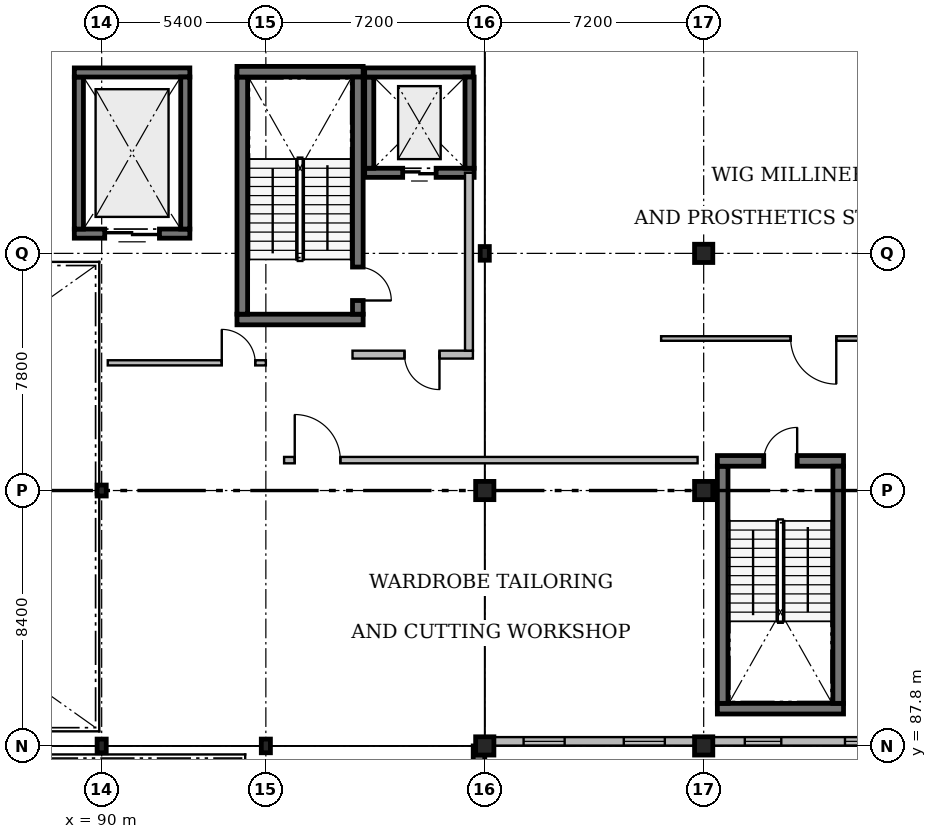
"""IFC4 building model, lengths in metres.
Left out: names, types, materials, properties, quantities, classifications, styles, units other than length and angle.
Written with IfcOpenShell. Run it as: python <this file> out.ifc"""

import sys

from ifc_helpers import new_model, si_unit, direction, frame, frame_2d, origin, origin_2d, place, context, subcontext, project, spatial, rectangle, i_section, extrude, element, fill, save


model = new_model("IFC4")
c1 = context("Model", 3, precision=1e-05, world=origin(), true_north=direction((0.0, 1.0)))
c2 = subcontext(c1, "Body", "Model", "MODEL_VIEW")
j1 = project(units=[si_unit("LENGTHUNIT", "METRE"), si_unit("PLANEANGLEUNIT", "RADIAN")], contexts=[c1])
p1 = place(None, origin())
s1 = spatial("IfcSite", under=j1, at=p1, CompositionType="ELEMENT")
p2 = place(p1, origin())
s2 = spatial("IfcBuilding", under=s1, at=p2, CompositionType="ELEMENT")
p3 = place(p2, frame((0.0, 0.0, 9.0)))
s3 = spatial("IfcBuildingStorey", under=s2, at=p3, CompositionType="ELEMENT", Elevation=9.0)
p4 = place(p3, frame((90.0, 87.8, 0.0), z_axis=(0.0, 0.0, 1.0), x_axis=(1.0, 0.0, 0.0)))
e1 = element("IfcColumn", 1, at=p4, inside=s3, PredefinedType="COLUMN", context=c2, shape_type="SweptSolid", body=[
    extrude(i_section(OverallWidth=0.3, OverallDepth=0.45, WebThickness=0.014, FlangeThickness=0.026, FilletRadius=0.027, at=origin_2d()), origin(), (0.0, 0.0, 1.0), 4.2),
])
p5 = place(p3, frame((90.0, 96.2, 0.0), z_axis=(0.0, 0.0, 1.0), x_axis=(1.0, 0.0, 0.0)))
e2 = element("IfcColumn", 2, at=p5, inside=s3, PredefinedType="COLUMN", context=c2, shape_type="SweptSolid", body=[
    extrude(i_section(OverallWidth=0.3, OverallDepth=0.36, WebThickness=0.012, FlangeThickness=0.022, FilletRadius=0.027, at=origin_2d()), origin(), (0.0, 0.0, 1.0), 4.2),
])
p6 = place(p3, frame((95.4, 87.8, 0.0), z_axis=(0.0, 0.0, 1.0), x_axis=(1.0, 0.0, 0.0)))
e3 = element("IfcColumn", 3, at=p6, inside=s3, PredefinedType="COLUMN", context=c2, shape_type="SweptSolid", body=[
    extrude(i_section(OverallWidth=0.3, OverallDepth=0.45, WebThickness=0.014, FlangeThickness=0.026, FilletRadius=0.027, at=origin_2d()), origin(), (0.0, 0.0, 1.0), 4.2),
])
for number, where, z_axis, x_axis in (
    (4, (102.6, 87.8, 0.0), (0.0, 0.0, 1.0), (1.0, 0.0, 0.0)),
    (5, (102.6, 96.2, 0.0), (0.0, 0.0, 1.0), (1.0, 0.0, 0.0)),
):
    element("IfcColumn", number, at=place(p3, frame(where, z_axis=z_axis, x_axis=x_axis)), inside=s3, PredefinedType="COLUMN", context=c2, shape_type="SweptSolid", body=[
        extrude(rectangle(XDim=0.6, YDim=0.6, at=origin_2d()), origin(), (0.0, 0.0, 1.0), 4.2),
    ])
p7 = place(p3, frame((102.6, 104.0, 0.0), z_axis=(0.0, 0.0, 1.0), x_axis=(1.0, 0.0, 0.0)))
e6 = element("IfcColumn", 6, at=p7, inside=s3, PredefinedType="COLUMN", context=c2, shape_type="SweptSolid", body=[
    extrude(i_section(OverallWidth=0.3, OverallDepth=0.45, WebThickness=0.014, FlangeThickness=0.026, FilletRadius=0.027, at=origin_2d()), origin(), (0.0, 0.0, 1.0), 4.2),
])
for number, where, z_axis, x_axis in (
    (7, (109.8, 87.8, 0.0), (0.0, 0.0, 1.0), (1.0, 0.0, 0.0)),
    (8, (109.8, 96.2, 0.0), (0.0, 0.0, 1.0), (1.0, 0.0, 0.0)),
    (9, (109.8, 104.0, 0.0), (0.0, 0.0, 1.0), (1.0, 0.0, 0.0)),
):
    element("IfcColumn", number, at=place(p3, frame(where, z_axis=z_axis, x_axis=x_axis)), inside=s3, PredefinedType="COLUMN", context=c2, shape_type="SweptSolid", body=[
        extrude(rectangle(XDim=0.6, YDim=0.6, at=origin_2d()), origin(), (0.0, 0.0, 1.0), 4.2),
    ])
p8 = place(p3, frame((98.6, 101.825, 0.0), z_axis=(0.0, 0.0, 1.0), x_axis=(-1.0, 0.0, 0.0)))
e10 = element("IfcWall", 10, at=p8, inside=s3, PredefinedType="SOLIDWALL", context=c2, shape_type="SweptSolid", body=[
    extrude(rectangle(XDim=4.15, YDim=0.35, at=frame_2d((2.075, 0.0))), origin(), (0.0, 0.0, 1.0), 4.2),
])
p9 = place(p3, frame((94.625, 102.0, 0.0), z_axis=(0.0, 0.0, 1.0), x_axis=(0.0, 1.0, 0.0)))
e11 = element("IfcWall", 11, at=p9, inside=s3, PredefinedType="SOLIDWALL", context=c2, shape_type="SweptSolid", body=[
    extrude(rectangle(XDim=7.8, YDim=0.35, at=frame_2d((3.9, 0.0))), origin(), (0.0, 0.0, 1.0), 4.2),
])
p10 = place(p3, frame((94.45, 109.975, 0.0), z_axis=(0.0, 0.0, 1.0), x_axis=(1.0, 0.0, 0.0)))
e12 = element("IfcWall", 12, at=p10, inside=s3, PredefinedType="SOLIDWALL", context=c2, shape_type="SweptSolid", body=[
    extrude(rectangle(XDim=4.15, YDim=0.35, at=frame_2d((2.075, 0.0))), origin(), (0.0, 0.0, 1.0), 4.2),
])
p11 = place(p3, frame((98.425, 109.8, 0.0), z_axis=(0.0, 0.0, 1.0), x_axis=(0.0, -1.0, 0.0)))
e13 = element("IfcWall", 13, at=p11, inside=s3, PredefinedType="SOLIDWALL", context=c2, shape_type="SweptSolid", body=[
    extrude(rectangle(XDim=7.8, YDim=0.35, at=frame_2d((3.9, 0.0))), origin(), (0.0, 0.0, 1.0), 4.2),
])
p12 = place(p11, frame((6.25, 0.0, 0.0)))
e14 = element("IfcOpeningElement", 14, at=p12, cuts=e13, PredefinedType="OPENING", context=c2, shape_type="SweptSolid", body=[
    extrude(rectangle(XDim=1.1, YDim=2.15, at=frame_2d((0.55, 1.075))), frame((0.0, 0.195, 0.0), z_axis=(0.0, -1.0, 0.0), x_axis=(1.0, 0.0, 0.0)), (0.0, 0.0, 1.0), 0.39),
])
p13 = place(p3, frame((102.25, 106.65, 0.0), z_axis=(0.0, 0.0, 1.0), x_axis=(-1.0, 0.0, 0.0)))
e15 = element("IfcWall", 15, at=p13, inside=s3, PredefinedType="SOLIDWALL", context=c2, shape_type="SweptSolid", body=[
    extrude(rectangle(XDim=3.6, YDim=0.3, at=frame_2d((1.8, 0.0))), origin(), (0.0, 0.0, 1.0), 4.2),
])
p14 = place(p13, frame((1.25, 0.0, 0.0)))
e16 = element("IfcOpeningElement", 16, at=p14, cuts=e15, PredefinedType="OPENING", context=c2, shape_type="SweptSolid", body=[
    extrude(rectangle(XDim=1.1, YDim=2.1, at=frame_2d((0.55, 1.05))), frame((0.0, 0.17, 0.0), z_axis=(0.0, -1.0, 0.0), x_axis=(1.0, 0.0, 0.0)), (0.0, 0.0, 1.0), 0.34),
])
p15 = place(p3, frame((98.8, 106.8, 0.0), z_axis=(0.0, 0.0, 1.0), x_axis=(0.0, 1.0, 0.0)))
e17 = element("IfcWall", 17, at=p15, inside=s3, PredefinedType="SOLIDWALL", context=c2, shape_type="SweptSolid", body=[
    extrude(rectangle(XDim=3.0, YDim=0.3, at=frame_2d((1.5, 0.0))), origin(), (0.0, 0.0, 1.0), 4.2),
])
p16 = place(p3, frame((98.65, 109.95, 0.0), z_axis=(0.0, 0.0, 1.0), x_axis=(1.0, 0.0, 0.0)))
e18 = element("IfcWall", 18, at=p16, inside=s3, PredefinedType="SOLIDWALL", context=c2, shape_type="SweptSolid", body=[
    extrude(rectangle(XDim=3.57, YDim=0.3, at=frame_2d((1.785, 0.0))), origin(), (0.0, 0.0, 1.0), 4.2),
])
p17 = place(p3, frame((102.1, 109.8, 0.0), z_axis=(0.0, 0.0, 1.0), x_axis=(0.0, -1.0, 0.0)))
e19 = element("IfcWall", 19, at=p17, inside=s3, PredefinedType="SOLIDWALL", context=c2, shape_type="SweptSolid", body=[
    extrude(rectangle(XDim=3.0, YDim=0.3, at=frame_2d((1.5, 0.0))), origin(), (0.0, 0.0, 1.0), 4.2),
])
p18 = place(p3, frame((102.21, 100.67, 0.0), z_axis=(0.0, 0.0, 1.0), x_axis=(-1.0, 0.0, 0.0)))
e20 = element("IfcWall", 20, at=p18, inside=s3, PredefinedType="SOLIDWALL", context=c2, shape_type="SweptSolid", body=[
    extrude(rectangle(XDim=3.96, YDim=0.26, at=frame_2d((1.98, 0.0))), origin(), (0.0, 0.0, 1.0), 3.95),
])
p19 = place(p18, frame((1.1, 0.0, 0.0)))
e21 = element("IfcOpeningElement", 21, at=p19, cuts=e20, PredefinedType="OPENING", context=c2, shape_type="SweptSolid", body=[
    extrude(rectangle(XDim=1.15, YDim=2.2, at=frame_2d((0.575, 1.1))), frame((0.0, 0.15, 0.0), z_axis=(0.0, -1.0, 0.0), x_axis=(1.0, 0.0, 0.0)), (0.0, 0.0, 1.0), 0.3),
])
p20 = place(p3, frame((102.08, 106.65, 0.0), z_axis=(0.0, 0.0, 1.0), x_axis=(0.0, -1.0, 0.0)))
e22 = element("IfcWall", 22, at=p20, inside=s3, PredefinedType="SOLIDWALL", context=c2, shape_type="SweptSolid", body=[
    extrude(rectangle(XDim=5.85, YDim=0.26, at=frame_2d((2.925, 0.0))), origin(), (0.0, 0.0, 1.0), 3.95),
])
p21 = place(p3, frame((114.4, 89.025, 0.0), z_axis=(0.0, 0.0, 1.0), x_axis=(-1.0, 0.0, 0.0)))
e23 = element("IfcWall", 23, at=p21, inside=s3, PredefinedType="SOLIDWALL", context=c2, shape_type="SweptSolid", body=[
    extrude(rectangle(XDim=4.15, YDim=0.35, at=frame_2d((2.075, 0.0))), origin(), (0.0, 0.0, 1.0), 4.2),
])
p22 = place(p3, frame((110.425, 89.2, 0.0), z_axis=(0.0, 0.0, 1.0), x_axis=(0.0, 1.0, 0.0)))
e24 = element("IfcWall", 24, at=p22, inside=s3, PredefinedType="SOLIDWALL", context=c2, shape_type="SweptSolid", body=[
    extrude(rectangle(XDim=7.8, YDim=0.35, at=frame_2d((3.9, 0.0))), origin(), (0.0, 0.0, 1.0), 4.2),
])
p23 = place(p3, frame((110.25, 97.175, 0.0), z_axis=(0.0, 0.0, 1.0), x_axis=(1.0, 0.0, 0.0)))
e25 = element("IfcWall", 25, at=p23, inside=s3, PredefinedType="SOLIDWALL", context=c2, shape_type="SweptSolid", body=[
    extrude(rectangle(XDim=4.15, YDim=0.35, at=frame_2d((2.075, 0.0))), origin(), (0.0, 0.0, 1.0), 4.2),
])
p24 = place(p23, frame((1.525, 0.0, 0.0)))
e26 = element("IfcOpeningElement", 26, at=p24, cuts=e25, PredefinedType="OPENING", context=c2, shape_type="SweptSolid", body=[
    extrude(rectangle(XDim=1.1, YDim=2.15, at=frame_2d((0.55, 1.075))), frame((0.0, 0.195, 0.0), z_axis=(0.0, -1.0, 0.0), x_axis=(1.0, 0.0, 0.0)), (0.0, 0.0, 1.0), 0.39),
])
p25 = place(p3, frame((114.225, 97.0, 0.0), z_axis=(0.0, 0.0, 1.0), x_axis=(0.0, -1.0, 0.0)))
e27 = element("IfcWall", 27, at=p25, inside=s3, PredefinedType="SOLIDWALL", context=c2, shape_type="SweptSolid", body=[
    extrude(rectangle(XDim=7.8, YDim=0.35, at=frame_2d((3.9, 0.0))), origin(), (0.0, 0.0, 1.0), 4.2),
])
p26 = place(p3, frame((92.9, 104.65, 0.0), z_axis=(0.0, 0.0, 1.0), x_axis=(-1.0, 0.0, 0.0)))
e28 = element("IfcWall", 28, at=p26, inside=s3, PredefinedType="SOLIDWALL", context=c2, shape_type="SweptSolid", body=[
    extrude(rectangle(XDim=3.8, YDim=0.3, at=frame_2d((1.9, 0.0))), origin(), (0.0, 0.0, 1.0), 4.2),
])
p27 = place(p26, frame((1.0, 0.0, 0.0)))
e29 = element("IfcOpeningElement", 29, at=p27, cuts=e28, PredefinedType="OPENING", context=c2, shape_type="SweptSolid", body=[
    extrude(rectangle(XDim=1.8, YDim=2.4, at=frame_2d((0.9, 1.2))), frame((0.0, 0.17, 0.0), z_axis=(0.0, -1.0, 0.0), x_axis=(1.0, 0.0, 0.0)), (0.0, 0.0, 1.0), 0.34),
])
p28 = place(p3, frame((89.25, 104.8, 0.0), z_axis=(0.0, 0.0, 1.0), x_axis=(0.0, 1.0, 0.0)))
e30 = element("IfcWall", 30, at=p28, inside=s3, PredefinedType="SOLIDWALL", context=c2, shape_type="SweptSolid", body=[
    extrude(rectangle(XDim=5.0, YDim=0.3, at=frame_2d((2.5, 0.0))), origin(), (0.0, 0.0, 1.0), 4.2),
])
p29 = place(p3, frame((89.1, 109.95, 0.0), z_axis=(0.0, 0.0, 1.0), x_axis=(1.0, 0.0, 0.0)))
e31 = element("IfcWall", 31, at=p29, inside=s3, PredefinedType="SOLIDWALL", context=c2, shape_type="SweptSolid", body=[
    extrude(rectangle(XDim=3.8, YDim=0.3, at=frame_2d((1.9, 0.0))), origin(), (0.0, 0.0, 1.0), 4.2),
])
p30 = place(p3, frame((92.75, 109.8, 0.0), z_axis=(0.0, 0.0, 1.0), x_axis=(0.0, -1.0, 0.0)))
e32 = element("IfcWall", 32, at=p30, inside=s3, PredefinedType="SOLIDWALL", context=c2, shape_type="SweptSolid", body=[
    extrude(rectangle(XDim=5.0, YDim=0.3, at=frame_2d((2.5, 0.0))), origin(), (0.0, 0.0, 1.0), 4.2),
])
p31 = place(p3, frame((102.41, 87.8, 0.0), z_axis=(0.0, 0.0, 1.0), x_axis=(0.0, -1.0, 0.0)))
e33 = element("IfcWall", 33, at=p31, inside=s3, PredefinedType="SOLIDWALL", context=c2, shape_type="SweptSolid", body=[
    extrude(rectangle(XDim=36.0, YDim=0.38, at=frame_2d((18.0, 0.0))), origin(), (0.0, 0.0, 1.0), 3.96),
])
p32 = place(p31, frame((3.09, 0.0, 0.95)))
e34 = element("IfcOpeningElement", 34, at=p32, cuts=e33, PredefinedType="OPENING", context=c2, shape_type="SweptSolid", body=[
    extrude(rectangle(XDim=1.02, YDim=1.8, at=frame_2d((0.51, 0.9))), frame((0.0, 0.21, 0.0), z_axis=(0.0, -1.0, 0.0), x_axis=(1.0, 0.0, 0.0)), (0.0, 0.0, 1.0), 0.42),
])
p33 = place(p31, frame((10.11, 0.0, 0.95)))
e35 = element("IfcOpeningElement", 35, at=p33, cuts=e33, PredefinedType="OPENING", context=c2, shape_type="SweptSolid", body=[
    extrude(rectangle(XDim=1.38, YDim=1.95, at=frame_2d((0.69, 0.975))), frame((0.0, 0.21, 0.0), z_axis=(0.0, -1.0, 0.0), x_axis=(1.0, 0.0, 0.0)), (0.0, 0.0, 1.0), 0.42),
])
p34 = place(p31, frame((17.375, 0.0, 0.95)))
e36 = element("IfcOpeningElement", 36, at=p34, cuts=e33, PredefinedType="OPENING", context=c2, shape_type="SweptSolid", body=[
    extrude(rectangle(XDim=1.25, YDim=1.9, at=frame_2d((0.625, 0.95))), frame((0.0, 0.21, 0.0), z_axis=(0.0, -1.0, 0.0), x_axis=(1.0, 0.0, 0.0)), (0.0, 0.0, 1.0), 0.42),
])
p35 = place(p31, frame((24.63, 0.0, 0.95)))
e37 = element("IfcOpeningElement", 37, at=p35, cuts=e33, PredefinedType="OPENING", context=c2, shape_type="SweptSolid", body=[
    extrude(rectangle(XDim=1.14, YDim=1.85, at=frame_2d((0.57, 0.925))), frame((0.0, 0.21, 0.0), z_axis=(0.0, -1.0, 0.0), x_axis=(1.0, 0.0, 0.0)), (0.0, 0.0, 1.0), 0.42),
])
p36 = place(p31, frame((31.525, 0.0, 0.95)))
e38 = element("IfcOpeningElement", 38, at=p36, cuts=e33, PredefinedType="OPENING", context=c2, shape_type="SweptSolid", body=[
    extrude(rectangle(XDim=1.75, YDim=1.65, at=frame_2d((0.875, 0.825))), frame((0.0, 0.21, 0.0), z_axis=(0.0, -1.0, 0.0), x_axis=(1.0, 0.0, 0.0)), (0.0, 0.0, 1.0), 0.42),
])
p37 = place(p3, frame((102.905, 87.95, 0.0), z_axis=(0.0, 0.0, 1.0), x_axis=(1.0, 0.0, 0.0)))
e39 = element("IfcWall", 39, at=p37, inside=s3, PredefinedType="SOLIDWALL", context=c2, shape_type="SweptSolid", body=[
    extrude(rectangle(XDim=6.59, YDim=0.28, at=frame_2d((3.295, 0.0))), origin(), (0.0, 0.0, 1.0), 3.263),
])
p38 = place(p37, frame((0.972, 0.0, 0.95)))
e40 = element("IfcOpeningElement", 40, at=p38, cuts=e39, PredefinedType="OPENING", context=c2, shape_type="SweptSolid", body=[
    extrude(rectangle(XDim=1.35, YDim=1.7, at=frame_2d((0.675, 0.85))), frame((0.0, 0.16, 0.0), z_axis=(0.0, -1.0, 0.0), x_axis=(1.0, 0.0, 0.0)), (0.0, 0.0, 1.0), 0.32),
])
p39 = place(p37, frame((4.268, 0.0, 0.95)))
e41 = element("IfcOpeningElement", 41, at=p39, cuts=e39, PredefinedType="OPENING", context=c2, shape_type="SweptSolid", body=[
    extrude(rectangle(XDim=1.35, YDim=1.7, at=frame_2d((0.675, 0.85))), frame((0.0, 0.16, 0.0), z_axis=(0.0, -1.0, 0.0), x_axis=(1.0, 0.0, 0.0)), (0.0, 0.0, 1.0), 0.32),
])
p40 = place(p3, frame((110.105, 87.95, 0.0), z_axis=(0.0, 0.0, 1.0), x_axis=(1.0, 0.0, 0.0)))
e42 = element("IfcWall", 42, at=p40, inside=s3, PredefinedType="SOLIDWALL", context=c2, shape_type="SweptSolid", body=[
    extrude(rectangle(XDim=6.59, YDim=0.28, at=frame_2d((3.295, 0.0))), origin(), (0.0, 0.0, 1.0), 3.263),
])
p41 = place(p40, frame((1.048, 0.0, 0.95)))
e43 = element("IfcOpeningElement", 43, at=p41, cuts=e42, PredefinedType="OPENING", context=c2, shape_type="SweptSolid", body=[
    extrude(rectangle(XDim=1.2, YDim=1.9, at=frame_2d((0.6, 0.95))), frame((0.0, 0.16, 0.0), z_axis=(0.0, -1.0, 0.0), x_axis=(1.0, 0.0, 0.0)), (0.0, 0.0, 1.0), 0.32),
])
p42 = place(p40, frame((4.343, 0.0, 0.95)))
e44 = element("IfcOpeningElement", 44, at=p42, cuts=e42, PredefinedType="OPENING", context=c2, shape_type="SweptSolid", body=[
    extrude(rectangle(XDim=1.2, YDim=1.9, at=frame_2d((0.6, 0.95))), frame((0.0, 0.16, 0.0), z_axis=(0.0, -1.0, 0.0), x_axis=(1.0, 0.0, 0.0)), (0.0, 0.0, 1.0), 0.32),
])
p43 = place(p3, frame((96.0, 97.2, 0.0), z_axis=(0.0, 0.0, 1.0), x_axis=(1.0, 0.0, 0.0)))
e45 = element("IfcWall", 45, at=p43, inside=s3, PredefinedType="PARTITIONING", context=c2, shape_type="SweptSolid", body=[
    extrude(rectangle(XDim=13.6, YDim=0.21, at=frame_2d((6.8, 0.0))), origin(), (0.0, 0.0, 1.0), 3.95),
])
p44 = place(p43, frame((0.35, 0.0, 0.0)))
e46 = element("IfcOpeningElement", 46, at=p44, cuts=e45, PredefinedType="OPENING", context=c2, shape_type="SweptSolid", body=[
    extrude(rectangle(XDim=1.5, YDim=2.25, at=frame_2d((0.75, 1.125))), frame((0.0, 0.125, 0.0), z_axis=(0.0, -1.0, 0.0), x_axis=(1.0, 0.0, 0.0)), (0.0, 0.0, 1.0), 0.25),
])
p45 = place(p3, frame((117.2, 101.2, 0.0), z_axis=(0.0, 0.0, 1.0), x_axis=(-1.0, 0.0, 0.0)))
e47 = element("IfcWall", 47, at=p45, inside=s3, PredefinedType="PARTITIONING", context=c2, shape_type="SweptSolid", body=[
    extrude(rectangle(XDim=8.8, YDim=0.15, at=frame_2d((4.4, 0.0))), origin(), (0.0, 0.0, 1.0), 3.93),
])
p46 = place(p45, frame((3.039, 0.0, 0.0)))
e48 = element("IfcOpeningElement", 48, at=p46, cuts=e47, PredefinedType="OPENING", context=c2, shape_type="SweptSolid", body=[
    extrude(rectangle(XDim=1.5, YDim=2.25, at=frame_2d((0.75, 1.125))), frame((0.0, 0.095, 0.0), z_axis=(0.0, -1.0, 0.0), x_axis=(1.0, 0.0, 0.0)), (0.0, 0.0, 1.0), 0.19),
])
p47 = place(p3, frame((90.2, 100.4, 0.0), z_axis=(0.0, 0.0, 1.0), x_axis=(1.0, 0.0, 0.0)))
e49 = element("IfcWall", 49, at=p47, inside=s3, PredefinedType="PARTITIONING", context=c2, shape_type="SweptSolid", body=[
    extrude(rectangle(XDim=5.2, YDim=0.17, at=frame_2d((2.6, 0.0))), origin(), (0.0, 0.0, 1.0), 3.95),
])
p48 = place(p47, frame((3.75, 0.0, 0.0)))
e50 = element("IfcOpeningElement", 50, at=p48, cuts=e49, PredefinedType="OPENING", context=c2, shape_type="SweptSolid", body=[
    extrude(rectangle(XDim=1.1, YDim=2.1, at=frame_2d((0.55, 1.05))), frame((0.0, 0.105, 0.0), z_axis=(0.0, -1.0, 0.0), x_axis=(1.0, 0.0, 0.0)), (0.0, 0.0, 1.0), 0.21),
])
p49 = place(p12, origin())
e51 = element("IfcDoor", 51, at=p49, inside=s3, OperationType="SINGLE_SWING_RIGHT", PredefinedType="DOOR", context=c2, shape_type="SweptSolid", body=[
    extrude(rectangle(XDim=1.1, YDim=2.15, at=frame_2d((0.55, 1.075))), frame((0.0, 0.025, 0.0), z_axis=(0.0, -1.0, 0.0), x_axis=(1.0, 0.0, 0.0)), (0.0, 0.0, 1.0), 0.05),
])
fill(e14, e51)
p50 = place(p14, origin())
e52 = element("IfcDoor", 52, at=p50, inside=s3, OperationType="DOUBLE_DOOR_SLIDING", PredefinedType="DOOR", context=c2, shape_type="SweptSolid", body=[
    extrude(rectangle(XDim=1.1, YDim=2.1, at=frame_2d((0.55, 1.05))), frame((0.0, 0.025, 0.0), z_axis=(0.0, -1.0, 0.0), x_axis=(1.0, 0.0, 0.0)), (0.0, 0.0, 1.0), 0.05),
])
fill(e16, e52)
p51 = place(p19, origin())
e53 = element("IfcDoor", 53, at=p51, inside=s3, OperationType="SINGLE_SWING_LEFT", PredefinedType="DOOR", context=c2, shape_type="SweptSolid", body=[
    extrude(rectangle(XDim=1.15, YDim=2.2, at=frame_2d((0.575, 1.1))), frame((0.0, 0.025, 0.0), z_axis=(0.0, -1.0, 0.0), x_axis=(1.0, 0.0, 0.0)), (0.0, 0.0, 1.0), 0.05),
])
fill(e21, e53)
p52 = place(p24, origin())
e54 = element("IfcDoor", 54, at=p52, inside=s3, OperationType="SINGLE_SWING_RIGHT", PredefinedType="DOOR", context=c2, shape_type="SweptSolid", body=[
    extrude(rectangle(XDim=1.1, YDim=2.15, at=frame_2d((0.55, 1.075))), frame((0.0, 0.025, 0.0), z_axis=(0.0, -1.0, 0.0), x_axis=(1.0, 0.0, 0.0)), (0.0, 0.0, 1.0), 0.05),
])
fill(e26, e54)
p53 = place(p27, origin())
e55 = element("IfcDoor", 55, at=p53, inside=s3, OperationType="DOUBLE_DOOR_SLIDING", PredefinedType="DOOR", context=c2, shape_type="SweptSolid", body=[
    extrude(rectangle(XDim=1.8, YDim=2.4, at=frame_2d((0.9, 1.2))), frame((0.0, 0.025, 0.0), z_axis=(0.0, -1.0, 0.0), x_axis=(1.0, 0.0, 0.0)), (0.0, 0.0, 1.0), 0.05),
])
fill(e29, e55)
p54 = place(p38, origin())
e56 = element("IfcWindow", 56, at=p54, inside=s3, PartitioningType="SINGLE_PANEL", PredefinedType="WINDOW", context=c2, shape_type="SweptSolid", body=[
    extrude(rectangle(XDim=1.35, YDim=1.7, at=frame_2d((0.675, 0.85))), frame((0.0, 0.03, 0.0), z_axis=(0.0, -1.0, 0.0), x_axis=(1.0, 0.0, 0.0)), (0.0, 0.0, 1.0), 0.06),
])
fill(e40, e56)
p55 = place(p39, origin())
e57 = element("IfcWindow", 57, at=p55, inside=s3, PartitioningType="SINGLE_PANEL", PredefinedType="WINDOW", context=c2, shape_type="SweptSolid", body=[
    extrude(rectangle(XDim=1.35, YDim=1.7, at=frame_2d((0.675, 0.85))), frame((0.0, 0.03, 0.0), z_axis=(0.0, -1.0, 0.0), x_axis=(1.0, 0.0, 0.0)), (0.0, 0.0, 1.0), 0.06),
])
fill(e41, e57)
p56 = place(p41, origin())
e58 = element("IfcWindow", 58, at=p56, inside=s3, PartitioningType="SINGLE_PANEL", PredefinedType="WINDOW", context=c2, shape_type="SweptSolid", body=[
    extrude(rectangle(XDim=1.2, YDim=1.9, at=frame_2d((0.6, 0.95))), frame((0.0, 0.03, 0.0), z_axis=(0.0, -1.0, 0.0), x_axis=(1.0, 0.0, 0.0)), (0.0, 0.0, 1.0), 0.06),
])
fill(e43, e58)
p57 = place(p42, origin())
e59 = element("IfcWindow", 59, at=p57, inside=s3, PartitioningType="SINGLE_PANEL", PredefinedType="WINDOW", context=c2, shape_type="SweptSolid", body=[
    extrude(rectangle(XDim=1.2, YDim=1.9, at=frame_2d((0.6, 0.95))), frame((0.0, 0.03, 0.0), z_axis=(0.0, -1.0, 0.0), x_axis=(1.0, 0.0, 0.0)), (0.0, 0.0, 1.0), 0.06),
])
fill(e44, e59)
p58 = place(p44, origin())
e60 = element("IfcDoor", 60, at=p58, inside=s3, OperationType="DOUBLE_DOOR_SINGLE_SWING", PredefinedType="DOOR", context=c2, shape_type="SweptSolid", body=[
    extrude(rectangle(XDim=1.5, YDim=2.25, at=frame_2d((0.75, 1.125))), frame((0.0, 0.025, 0.0), z_axis=(0.0, -1.0, 0.0), x_axis=(1.0, 0.0, 0.0)), (0.0, 0.0, 1.0), 0.05),
])
fill(e46, e60)
p59 = place(p46, origin())
e61 = element("IfcDoor", 61, at=p59, inside=s3, OperationType="DOUBLE_DOOR_SINGLE_SWING", PredefinedType="DOOR", context=c2, shape_type="SweptSolid", body=[
    extrude(rectangle(XDim=1.5, YDim=2.25, at=frame_2d((0.75, 1.125))), frame((0.0, 0.025, 0.0), z_axis=(0.0, -1.0, 0.0), x_axis=(1.0, 0.0, 0.0)), (0.0, 0.0, 1.0), 0.05),
])
fill(e48, e61)
p60 = place(p48, origin())
e62 = element("IfcDoor", 62, at=p60, inside=s3, OperationType="SINGLE_SWING_LEFT", PredefinedType="DOOR", context=c2, shape_type="SweptSolid", body=[
    extrude(rectangle(XDim=1.1, YDim=2.1, at=frame_2d((0.55, 1.05))), frame((0.0, 0.025, 0.0), z_axis=(0.0, -1.0, 0.0), x_axis=(1.0, 0.0, 0.0)), (0.0, 0.0, 1.0), 0.05),
])
fill(e50, e62)
save(model, sys.argv[1])
